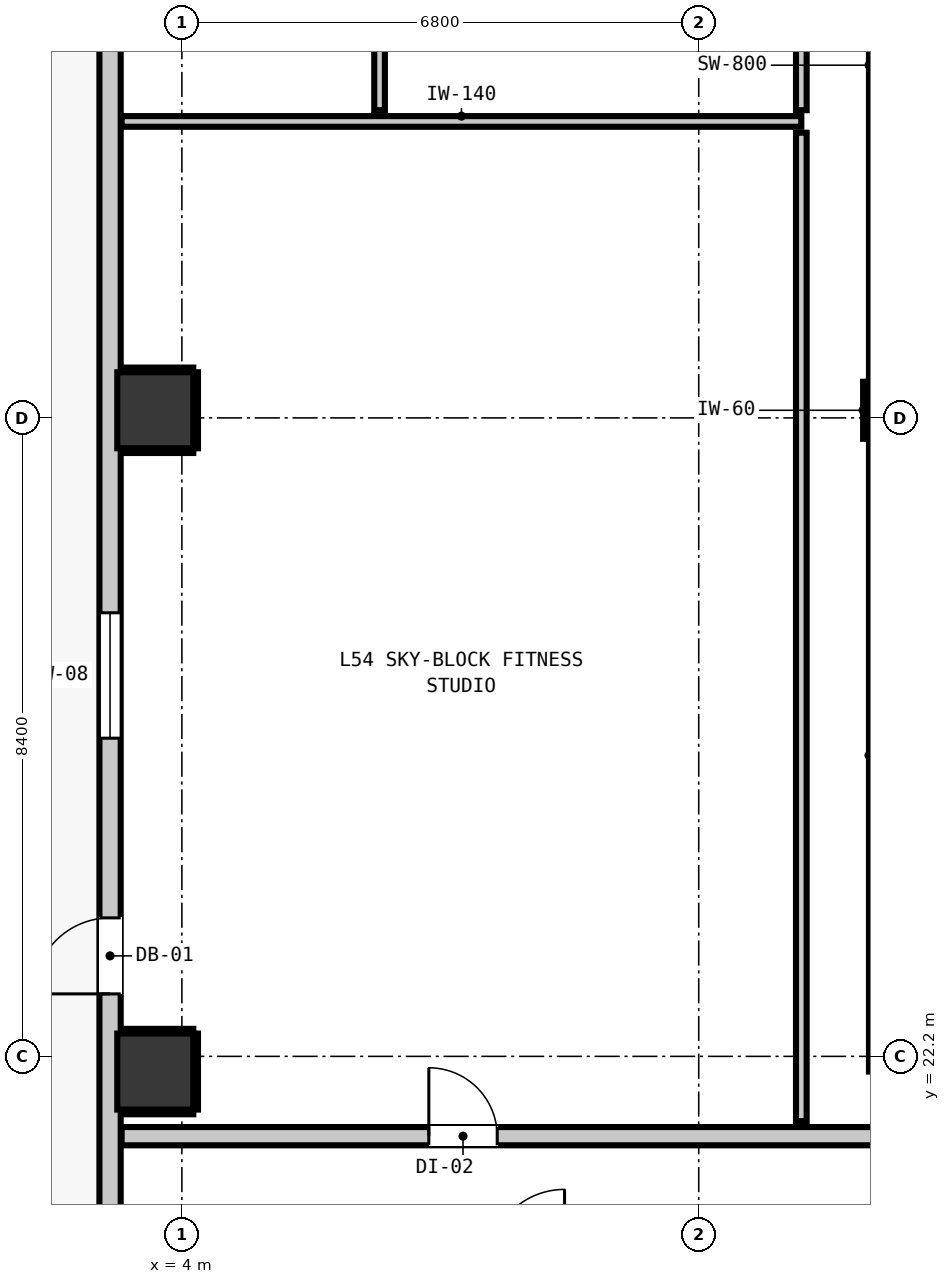
"""IFC4 building model, lengths in metres.
Left out: names, types, materials, properties, quantities, classifications, styles, units other than length and angle.
Written with IfcOpenShell. Run it as: python <this file> out.ifc"""

import sys

from ifc_helpers import new_model, si_unit, direction, frame, frame_2d, origin, origin_2d, place, context, subcontext, project, spatial, rectangle, extrude, element, fill, save


model = new_model("IFC4")
c1 = context("Model", 3, precision=1e-05, world=origin(), true_north=direction((0.0, 1.0)))
c2 = subcontext(c1, "Body", "Model", "MODEL_VIEW")
j1 = project(units=[si_unit("LENGTHUNIT", "METRE"), si_unit("PLANEANGLEUNIT", "RADIAN")], contexts=[c1])
p1 = place(None, origin())
s1 = spatial("IfcSite", under=j1, at=p1, CompositionType="ELEMENT")
p2 = place(p1, origin())
s2 = spatial("IfcBuilding", under=s1, at=p2, CompositionType="ELEMENT")
p3 = place(p2, frame((0.0, 0.0, 186.84)))
s3 = spatial("IfcBuildingStorey", under=s2, at=p3, CompositionType="ELEMENT", Elevation=186.84)
p4 = place(p3, frame((13.4, 30.7, 0.0), z_axis=(0.0, 0.0, 1.0), x_axis=(1.0, 0.0, 0.0)))
e1 = element("IfcColumn", 1, at=p4, inside=s3, PredefinedType="COLUMN", context=c2, shape_type="SweptSolid", body=[
    extrude(rectangle(XDim=0.75, YDim=0.75, at=origin_2d()), origin(), (0.0, 0.0, 1.0), 3.32),
])
p5 = place(p3, frame((13.44, 22.0, 0.0), z_axis=(0.0, 0.0, 1.0), x_axis=(0.0, 1.0, 0.0)))
e2 = element("IfcWall", 2, at=p5, inside=s3, PredefinedType="SHEAR", context=c2, shape_type="SweptSolid", body=[
    extrude(rectangle(XDim=8.32, YDim=0.8, at=frame_2d((4.16, 0.0))), origin(), (0.0, 0.0, 1.0), 3.32),
])
p6 = place(p3, frame((13.44, 31.08, 0.0), z_axis=(0.0, 0.0, 1.0), x_axis=(0.0, 1.0, 0.0)))
e3 = element("IfcWall", 3, at=p6, inside=s3, PredefinedType="SHEAR", context=c2, shape_type="SweptSolid", body=[
    extrude(rectangle(XDim=8.32, YDim=0.8, at=frame_2d((4.16, 0.0))), origin(), (0.0, 0.0, 1.0), 3.32),
])
for number, where, z_axis, x_axis in (
    (4, (3.65, 22.0, 0.0), (0.0, 0.0, 1.0), (1.0, 0.0, 0.0)),
    (5, (3.65, 30.7, 0.0), (0.0, 0.0, 1.0), (1.0, 0.0, 0.0)),
):
    element("IfcColumn", number, at=place(p3, frame(where, z_axis=z_axis, x_axis=x_axis)), inside=s3, PredefinedType="COLUMN", context=c2, shape_type="SweptSolid", body=[
        extrude(rectangle(XDim=1.0, YDim=1.0, at=origin_2d()), origin(), (0.0, 0.0, 1.0), 2.9),
    ])
p7 = place(p3, frame((3.055, 17.555, 0.0), z_axis=(0.0, 0.0, 1.0), x_axis=(0.0, 1.0, 0.0)))
e6 = element("IfcWall", 6, at=p7, inside=s3, PredefinedType="STANDARD", context=c2, shape_type="SweptSolid", body=[
    extrude(rectangle(XDim=32.29, YDim=0.28, at=frame_2d((16.145, 0.0))), origin(), (0.0, 0.0, 1.0), 2.9),
])
p8 = place(p7, frame((5.467, 0.0, 0.0)))
e7 = element("IfcOpeningElement", 7, at=p8, cuts=e6, PredefinedType="OPENING", context=c2, shape_type="SweptSolid", body=[
    extrude(rectangle(XDim=1.0, YDim=2.15, at=frame_2d((0.5, 1.075))), frame((0.0, 0.15, 0.0), z_axis=(0.0, -1.0, 0.0), x_axis=(1.0, 0.0, 0.0)), (0.0, 0.0, 1.0), 0.3),
])
p9 = place(p7, frame((8.831, 0.0, 0.85)))
e8 = element("IfcOpeningElement", 8, at=p9, cuts=e6, PredefinedType="OPENING", context=c2, shape_type="SweptSolid", body=[
    extrude(rectangle(XDim=1.65, YDim=1.75, at=frame_2d((0.825, 0.875))), frame((0.0, 0.15, 0.0), z_axis=(0.0, -1.0, 0.0), x_axis=(1.0, 0.0, 0.0)), (0.0, 0.0, 1.0), 0.3),
])
p10 = place(p3, frame((3.207, 21.15, 0.0), z_axis=(0.0, 0.0, 1.0), x_axis=(1.0, 0.0, 0.0)))
e9 = element("IfcWall", 9, at=p10, inside=s3, PredefinedType="PARTITIONING", context=c2, shape_type="SweptSolid", body=[
    extrude(rectangle(XDim=39.386, YDim=0.24, at=frame_2d((19.693, 0.0))), origin(), (0.0, 0.0, 1.0), 2.9),
])
p11 = place(p10, frame((15.003, 0.0, 0.0)))
e10 = element("IfcOpeningElement", 10, at=p11, cuts=e9, PredefinedType="OPENING", context=c2, shape_type="SweptSolid", body=[
    extrude(rectangle(XDim=1.1, YDim=2.15, at=frame_2d((0.55, 1.075))), frame((0.0, 0.13, 0.0), z_axis=(0.0, -1.0, 0.0), x_axis=(1.0, 0.0, 0.0)), (0.0, 0.0, 1.0), 0.26),
])
p12 = place(p10, frame((4.042, 0.0, 0.0)))
e11 = element("IfcOpeningElement", 11, at=p12, cuts=e9, PredefinedType="OPENING", context=c2, shape_type="SweptSolid", body=[
    extrude(rectangle(XDim=0.9, YDim=2.1, at=frame_2d((0.45, 1.05))), frame((0.0, 0.13, 0.0), z_axis=(0.0, -1.0, 0.0), x_axis=(1.0, 0.0, 0.0)), (0.0, 0.0, 1.0), 0.26),
])
p13 = place(p10, frame((36.444, 0.0, 0.0)))
e12 = element("IfcOpeningElement", 12, at=p13, cuts=e9, PredefinedType="OPENING", context=c2, shape_type="SweptSolid", body=[
    extrude(rectangle(XDim=1.0, YDim=2.15, at=frame_2d((0.5, 1.075))), frame((0.0, 0.13, 0.0), z_axis=(0.0, -1.0, 0.0), x_axis=(1.0, 0.0, 0.0)), (0.0, 0.0, 1.0), 0.26),
])
p14 = place(p3, frame((3.207, 34.5, 0.0), z_axis=(0.0, 0.0, 1.0), x_axis=(1.0, 0.0, 0.0)))
e13 = element("IfcWall", 13, at=p14, inside=s3, PredefinedType="PARTITIONING", context=c2, shape_type="SweptSolid", body=[
    extrude(rectangle(XDim=8.943, YDim=0.14, at=frame_2d((4.471, 0.0))), origin(), (0.0, 0.0, 1.0), 2.9),
])
p15 = place(p3, frame((6.601, 34.648, 0.0), z_axis=(0.0, 0.0, 1.0), x_axis=(0.0, 1.0, 0.0)))
e14 = element("IfcWall", 14, at=p15, inside=s3, PredefinedType="PARTITIONING", context=c2, shape_type="SweptSolid", body=[
    extrude(rectangle(XDim=5.434, YDim=0.14, at=frame_2d((2.717, 0.0))), origin(), (0.0, 0.0, 1.0), 2.9),
])
p16 = place(p3, frame((12.15, 21.348, 0.0), z_axis=(0.0, 0.0, 1.0), x_axis=(0.0, 1.0, 0.0)))
e15 = element("IfcWall", 15, at=p16, inside=s3, PredefinedType="PARTITIONING", context=c2, shape_type="SweptSolid", body=[
    extrude(rectangle(XDim=13.004, YDim=0.14, at=frame_2d((6.502, 0.0))), origin(), (0.0, 0.0, 1.0), 2.9),
])
p17 = place(p3, frame((12.15, 34.648, 0.0), z_axis=(0.0, 0.0, 1.0), x_axis=(0.0, 1.0, 0.0)))
e16 = element("IfcWall", 16, at=p17, inside=s3, PredefinedType="PARTITIONING", context=c2, shape_type="SweptSolid", body=[
    extrude(rectangle(XDim=5.434, YDim=0.14, at=frame_2d((2.717, 0.0))), origin(), (0.0, 0.0, 1.0), 2.9),
])
p18 = place(p3, frame((12.993, 30.325, 0.0), z_axis=(0.0, 0.0, 1.0), x_axis=(0.0, 1.0, 0.0)))
e17 = element("IfcWall", 17, at=p18, inside=s3, PredefinedType="PARTITIONING", context=c2, shape_type="SweptSolid", body=[
    extrude(rectangle(XDim=0.75, YDim=0.06, at=frame_2d((0.375, 0.0))), origin(), (0.0, 0.0, 1.0), 0.905),
])
for number, where, z_axis, x_axis in (
    (18, (3.21, 21.468, 0.0), (0.0, 0.0, 1.0), (1.0, 0.0, 0.0)),
    (19, (3.21, 22.532, 0.0), (0.0, 0.0, 1.0), (1.0, 0.0, 0.0)),
):
    element("IfcWall", number, at=place(p3, frame(where, z_axis=z_axis, x_axis=x_axis)), inside=s3, PredefinedType="PARTITIONING", context=c2, shape_type="SweptSolid", body=[
        extrude(rectangle(XDim=0.94, YDim=0.06, at=frame_2d((0.47, 0.0))), origin(), (0.0, 0.0, 1.0), 0.905),
    ])
p19 = place(p3, frame((4.182, 21.5, 0.0), z_axis=(0.0, 0.0, 1.0), x_axis=(0.0, 1.0, 0.0)))
e20 = element("IfcWall", 20, at=p19, inside=s3, PredefinedType="PARTITIONING", context=c2, shape_type="SweptSolid", body=[
    extrude(rectangle(XDim=1.0, YDim=0.06, at=frame_2d((0.5, 0.0))), origin(), (0.0, 0.0, 1.0), 1.45),
])
for number, where, z_axis, x_axis in (
    (21, (3.21, 30.168, 0.0), (0.0, 0.0, 1.0), (1.0, 0.0, 0.0)),
    (22, (3.21, 31.232, 0.0), (0.0, 0.0, 1.0), (1.0, 0.0, 0.0)),
):
    element("IfcWall", number, at=place(p3, frame(where, z_axis=z_axis, x_axis=x_axis)), inside=s3, PredefinedType="PARTITIONING", context=c2, shape_type="SweptSolid", body=[
        extrude(rectangle(XDim=0.94, YDim=0.06, at=frame_2d((0.47, 0.0))), origin(), (0.0, 0.0, 1.0), 0.905),
    ])
p20 = place(p3, frame((4.182, 30.2, 0.0), z_axis=(0.0, 0.0, 1.0), x_axis=(0.0, 1.0, 0.0)))
e23 = element("IfcWall", 23, at=p20, inside=s3, PredefinedType="PARTITIONING", context=c2, shape_type="SweptSolid", body=[
    extrude(rectangle(XDim=1.0, YDim=0.06, at=frame_2d((0.5, 0.0))), origin(), (0.0, 0.0, 1.0), 1.45),
])
p21 = place(p8, origin())
e24 = element("IfcDoor", 24, at=p21, inside=s3, OperationType="SINGLE_SWING_LEFT", PredefinedType="DOOR", context=c2, shape_type="SweptSolid", body=[
    extrude(rectangle(XDim=1.0, YDim=2.15, at=frame_2d((0.5, 1.075))), frame((0.0, 0.025, 0.0), z_axis=(0.0, -1.0, 0.0), x_axis=(1.0, 0.0, 0.0)), (0.0, 0.0, 1.0), 0.05),
])
fill(e7, e24)
p22 = place(p9, origin())
e25 = element("IfcWindow", 25, at=p22, inside=s3, PartitioningType="SINGLE_PANEL", PredefinedType="WINDOW", context=c2, shape_type="SweptSolid", body=[
    extrude(rectangle(XDim=1.65, YDim=1.75, at=frame_2d((0.825, 0.875))), frame((0.0, 0.03, 0.0), z_axis=(0.0, -1.0, 0.0), x_axis=(1.0, 0.0, 0.0)), (0.0, 0.0, 1.0), 0.06),
])
fill(e8, e25)
p23 = place(p12, origin())
e26 = element("IfcDoor", 26, at=p23, inside=s3, OperationType="SINGLE_SWING_LEFT", PredefinedType="DOOR", context=c2, shape_type="SweptSolid", body=[
    extrude(rectangle(XDim=0.9, YDim=2.1, at=frame_2d((0.45, 1.05))), frame((0.0, 0.025, 0.0), z_axis=(0.0, -1.0, 0.0), x_axis=(1.0, 0.0, 0.0)), (0.0, 0.0, 1.0), 0.05),
])
fill(e11, e26)
save(model, sys.argv[1])
